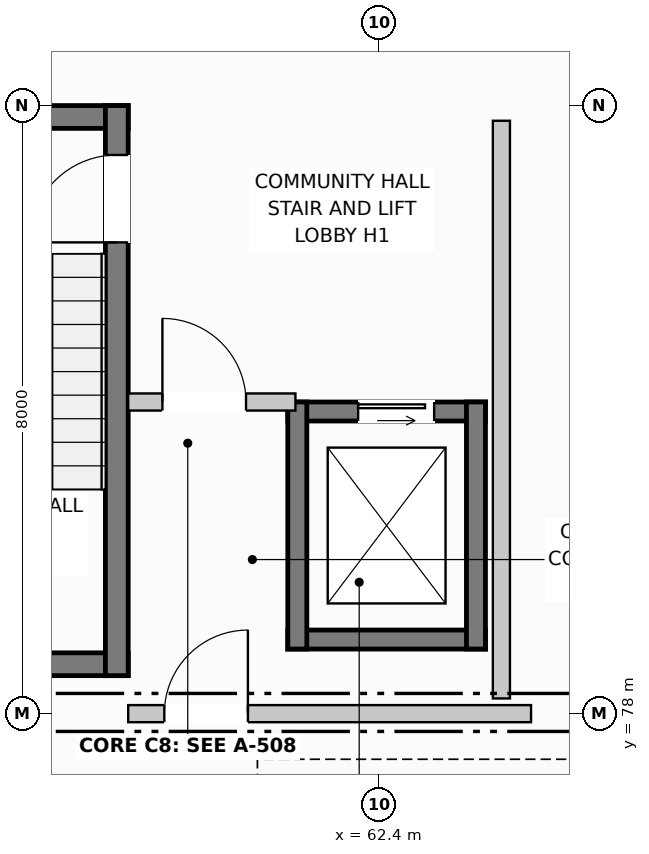
"""IFC4 building model, lengths in metres.
Left out: names, types, materials, properties, quantities, classifications, styles, units other than length and angle.
Written with IfcOpenShell. Run it as: python <this file> out.ifc"""

import sys

from ifc_helpers import new_model, si_unit, direction, frame, frame_2d, origin, origin_with_axes, place, context, subcontext, project, spatial, rectangle, extrude, element, fill, save


model = new_model("IFC4")
c1 = context("Model", 3, precision=1e-05, world=origin(), true_north=direction((0.0, 1.0)))
c2 = subcontext(c1, "Body", "Model", "MODEL_VIEW")
j1 = project(units=[si_unit("LENGTHUNIT", "METRE"), si_unit("PLANEANGLEUNIT", "RADIAN")], contexts=[c1])
p1 = place(None, origin())
s1 = spatial("IfcSite", under=j1, at=p1, CompositionType="ELEMENT")
p2 = place(p1, origin())
s2 = spatial("IfcBuilding", under=s1, at=p2, CompositionType="ELEMENT")
p3 = place(p2, frame((0.0, 0.0, -3.8)))
s3 = spatial("IfcBuildingStorey", under=s2, at=p3, CompositionType="ELEMENT", Elevation=-3.8)
for number, where, z_axis, x_axis in (
    (1, (55.5, 85.85, 0.0), (0.0, 0.0, 1.0), (1.0, 0.0, 0.0)),
    (2, (55.5, 78.65, 0.0), (0.0, 0.0, 1.0), (1.0, 0.0, 0.0)),
):
    element("IfcWall", number, at=place(p3, frame(where, z_axis=z_axis, x_axis=x_axis)), inside=s3, PredefinedType="SHEAR", context=c2, shape_type="SweptSolid", body=[
        extrude(rectangle(XDim=3.6, YDim=0.3, at=frame_2d((1.8, 0.0))), origin(), (0.0, 0.0, 1.0), 3.48),
    ])
p4 = place(p3, frame((58.95, 78.5, 0.0), z_axis=(0.0, 0.0, 1.0), x_axis=(0.0, 1.0, 0.0)))
e3 = element("IfcWall", 3, at=p4, inside=s3, PredefinedType="SHEAR", context=c2, shape_type="SweptSolid", body=[
    extrude(rectangle(XDim=7.5, YDim=0.3, at=frame_2d((3.75, 0.0))), origin(), (0.0, 0.0, 1.0), 3.48),
])
p5 = place(p4, frame((5.7, 0.0, 0.0)))
e4 = element("IfcOpeningElement", 4, at=p5, cuts=e3, PredefinedType="OPENING", context=c2, shape_type="SweptSolid", body=[
    extrude(rectangle(XDim=1.15, YDim=2.15, at=frame_2d((0.575, 1.075))), frame((0.0, 0.162, 0.0), z_axis=(0.0, -1.0, 0.0), x_axis=(1.0, 0.0, 0.0)), (0.0, 0.0, 1.0), 0.324),
])
p6 = place(p3, frame((61.2, 81.975, 0.0), z_axis=(0.0, 0.0, 1.0), x_axis=(1.0, 0.0, 0.0)))
e5 = element("IfcWall", 5, at=p6, inside=s3, PredefinedType="SHEAR", context=c2, shape_type="SweptSolid", body=[
    extrude(rectangle(XDim=2.6, YDim=0.25, at=frame_2d((1.3, 0.0))), origin(), (0.0, 0.0, 1.0), 3.48),
])
p7 = place(p6, frame((0.925, 0.0, 0.0)))
e6 = element("IfcOpeningElement", 6, at=p7, cuts=e5, PredefinedType="OPENING", context=c2, shape_type="SweptSolid", body=[
    extrude(rectangle(XDim=1.0, YDim=2.1, at=frame_2d((0.5, 1.05))), frame((0.0, 0.137, 0.0), z_axis=(0.0, -1.0, 0.0), x_axis=(1.0, 0.0, 0.0)), (0.0, 0.0, 1.0), 0.274),
])
p8 = place(p3, frame((61.2, 78.975, 0.0), z_axis=(0.0, 0.0, 1.0), x_axis=(1.0, 0.0, 0.0)))
e7 = element("IfcWall", 7, at=p8, inside=s3, PredefinedType="SHEAR", context=c2, shape_type="SweptSolid", body=[
    extrude(rectangle(XDim=2.6, YDim=0.25, at=frame_2d((1.3, 0.0))), origin(), (0.0, 0.0, 1.0), 3.48),
])
for number, where, z_axis, x_axis in (
    (8, (61.325, 78.85, 0.0), (0.0, 0.0, 1.0), (0.0, 1.0, 0.0)),
    (9, (63.675, 78.85, 0.0), (0.0, 0.0, 1.0), (0.0, 1.0, 0.0)),
):
    element("IfcWall", number, at=place(p3, frame(where, z_axis=z_axis, x_axis=x_axis)), inside=s3, PredefinedType="SHEAR", context=c2, shape_type="SweptSolid", body=[
        extrude(rectangle(XDim=3.25, YDim=0.25, at=frame_2d((1.625, 0.0))), origin(), (0.0, 0.0, 1.0), 3.48),
    ])
p9 = place(p3, frame((64.01, 78.2, 0.0), z_axis=(0.0, 0.0, 1.0), x_axis=(0.0, 1.0, 0.0)))
e10 = element("IfcWall", 10, at=p9, inside=s3, PredefinedType="PARTITIONING", context=c2, shape_type="SweptSolid", body=[
    extrude(rectangle(XDim=7.6, YDim=0.225, at=frame_2d((3.8, 0.0))), origin(), (0.0, 0.0, 1.0), 3.48),
])
p10 = place(p3, frame((59.1, 82.1, 0.0), z_axis=(0.0, 0.0, 1.0), x_axis=(1.0, 0.0, 0.0)))
e11 = element("IfcWall", 11, at=p10, inside=s3, PredefinedType="PARTITIONING", context=c2, shape_type="SweptSolid", body=[
    extrude(rectangle(XDim=2.2, YDim=0.225, at=frame_2d((1.1, 0.0))), origin(), (0.0, 0.0, 1.0), 3.48),
])
p11 = place(p10, frame((0.45, 0.0, 0.0)))
e12 = element("IfcOpeningElement", 12, at=p11, cuts=e11, PredefinedType="OPENING", context=c2, shape_type="SweptSolid", body=[
    extrude(rectangle(XDim=1.1, YDim=2.15, at=frame_2d((0.55, 1.075))), frame((0.0, 0.125, 0.0), z_axis=(0.0, -1.0, 0.0), x_axis=(1.0, 0.0, 0.0)), (0.0, 0.0, 1.0), 0.249),
])
p12 = place(p3, frame((59.1, 78.0, 0.0), z_axis=(0.0, 0.0, 1.0), x_axis=(1.0, 0.0, 0.0)))
e13 = element("IfcWall", 13, at=p12, inside=s3, PredefinedType="PARTITIONING", context=c2, shape_type="SweptSolid", body=[
    extrude(rectangle(XDim=5.3, YDim=0.225, at=frame_2d((2.65, 0.0))), origin(), (0.0, 0.0, 1.0), 2.57),
])
p13 = place(p12, frame((0.475, 0.0, 0.0)))
e14 = element("IfcOpeningElement", 14, at=p13, cuts=e13, PredefinedType="OPENING", context=c2, shape_type="SweptSolid", body=[
    extrude(rectangle(XDim=1.1, YDim=2.15, at=frame_2d((0.55, 1.075))), frame((0.0, 0.125, 0.0), z_axis=(0.0, -1.0, 0.0), x_axis=(1.0, 0.0, 0.0)), (0.0, 0.0, 1.0), 0.249),
])
p14 = place(p5, origin_with_axes())
e15 = element("IfcDoor", 15, at=p14, inside=s3, OperationType="SINGLE_SWING_LEFT", PredefinedType="DOOR", context=c2, shape_type="SweptSolid", body=[
    extrude(rectangle(XDim=1.15, YDim=2.15, at=frame_2d((0.575, 1.075))), frame((0.0, 0.025, 0.0), z_axis=(0.0, -1.0, 0.0), x_axis=(1.0, 0.0, 0.0)), (0.0, 0.0, 1.0), 0.05),
])
fill(e4, e15)
p15 = place(p7, origin_with_axes())
e16 = element("IfcDoor", 16, at=p15, inside=s3, OperationType="SLIDING_TO_LEFT", PredefinedType="DOOR", context=c2, shape_type="SweptSolid", body=[
    extrude(rectangle(XDim=1.0, YDim=2.1, at=frame_2d((0.5, 1.05))), frame((0.0, 0.025, 0.0), z_axis=(0.0, -1.0, 0.0), x_axis=(1.0, 0.0, 0.0)), (0.0, 0.0, 1.0), 0.05),
])
fill(e6, e16)
p16 = place(p11, origin_with_axes())
e17 = element("IfcDoor", 17, at=p16, inside=s3, OperationType="SINGLE_SWING_LEFT", PredefinedType="DOOR", context=c2, shape_type="SweptSolid", body=[
    extrude(rectangle(XDim=1.1, YDim=2.15, at=frame_2d((0.55, 1.075))), frame((0.0, 0.025, 0.0), z_axis=(0.0, -1.0, 0.0), x_axis=(1.0, 0.0, 0.0)), (0.0, 0.0, 1.0), 0.05),
])
fill(e12, e17)
p17 = place(p13, origin_with_axes())
e18 = element("IfcDoor", 18, at=p17, inside=s3, OperationType="SINGLE_SWING_RIGHT", PredefinedType="DOOR", context=c2, shape_type="SweptSolid", body=[
    extrude(rectangle(XDim=1.1, YDim=2.15, at=frame_2d((0.55, 1.075))), frame((0.0, 0.025, 0.0), z_axis=(0.0, -1.0, 0.0), x_axis=(1.0, 0.0, 0.0)), (0.0, 0.0, 1.0), 0.05),
])
fill(e14, e18)
save(model, sys.argv[1])
